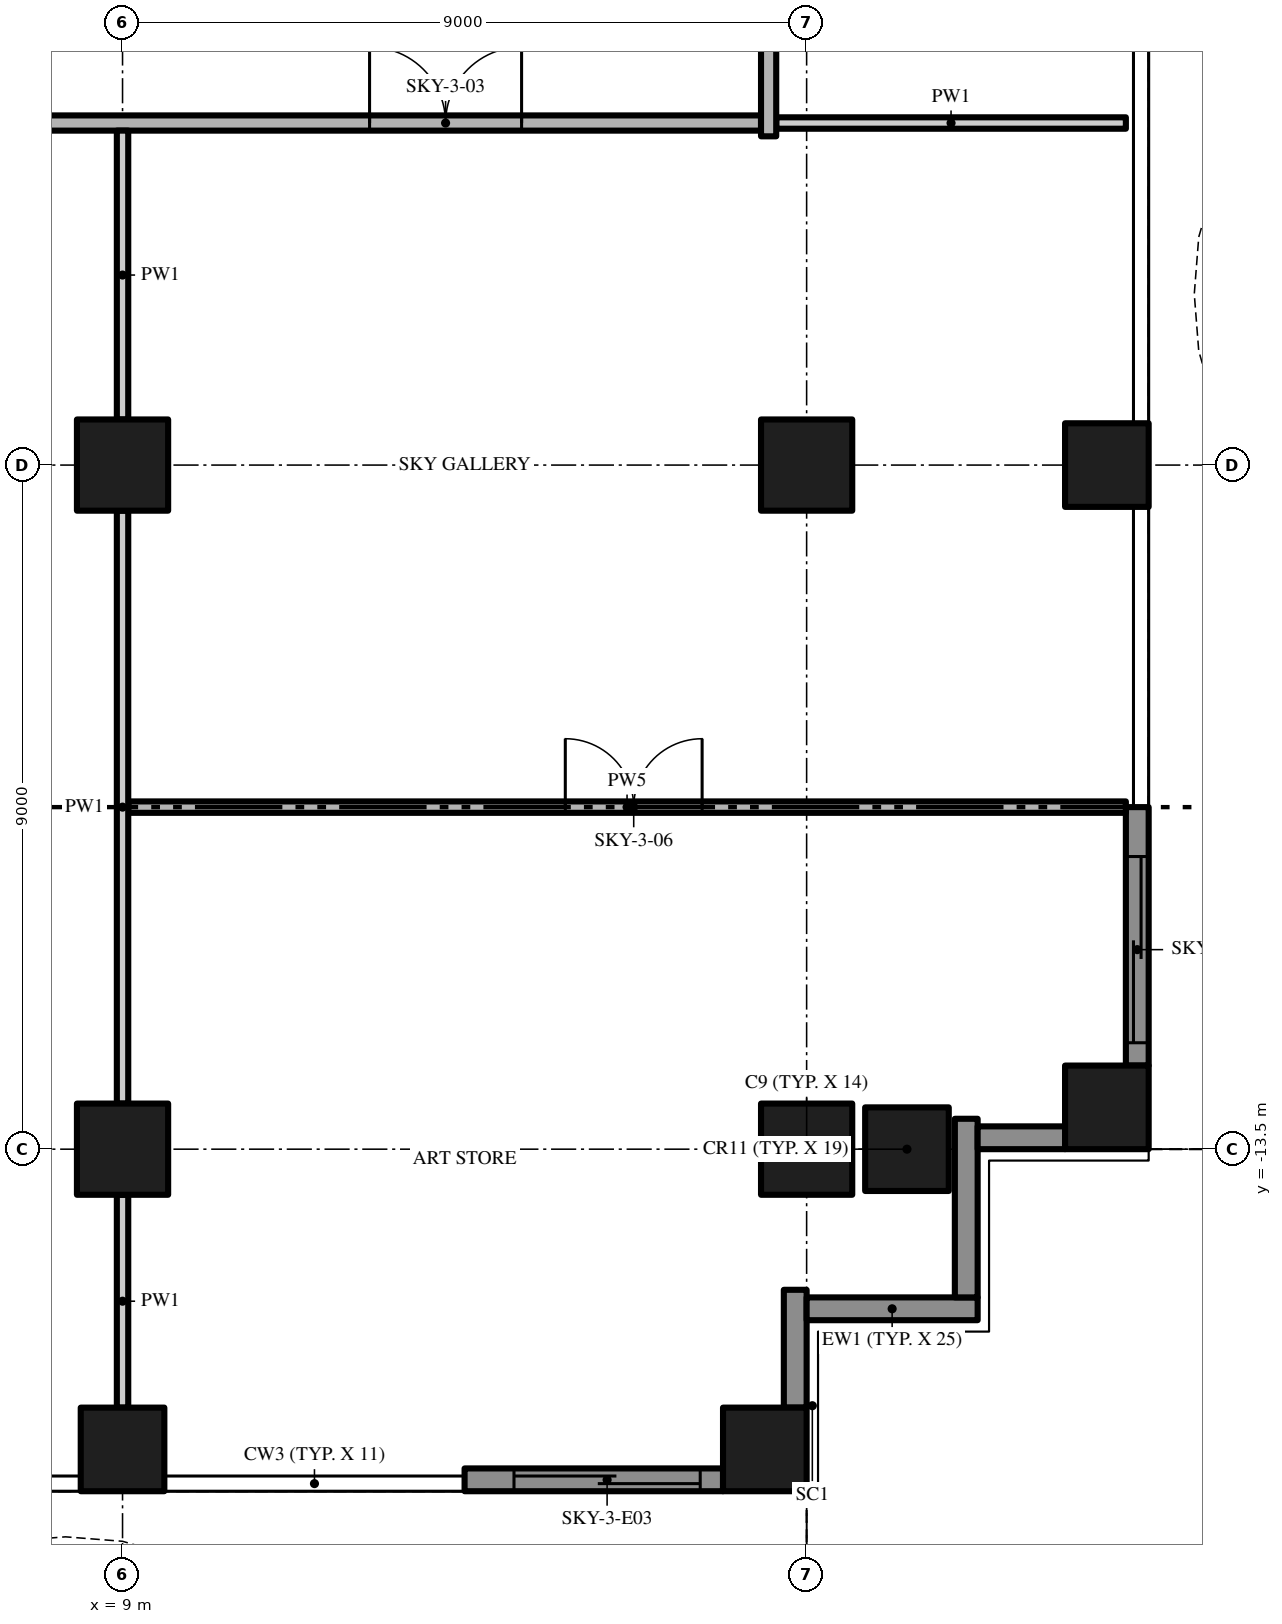
"""IFC4 building model, lengths in metres.
Left out: names, types, materials, properties, quantities, classifications, styles, units other than length and angle.
Written with IfcOpenShell. Run it as: python <this file> out.ifc"""

import sys

from ifc_helpers import new_model, si_unit, direction, frame, frame_2d, origin, origin_2d, place, context, subcontext, project, spatial, polyline, rectangle, outline, extrude, element, fill, save


model = new_model("IFC4")
c1 = context("Model", 3, precision=1e-05, world=origin(), true_north=direction((0.0, 1.0)))
c2 = subcontext(c1, "Body", "Model", "MODEL_VIEW")
j1 = project(units=[si_unit("LENGTHUNIT", "METRE"), si_unit("PLANEANGLEUNIT", "RADIAN")], contexts=[c1])
p1 = place(None, origin())
s1 = spatial("IfcSite", under=j1, at=p1, CompositionType="ELEMENT")
p2 = place(p1, origin())
s2 = spatial("IfcBuilding", under=s1, at=p2, CompositionType="ELEMENT")
p3 = place(p2, frame((0.0, 0.0, 174.4)))
s3 = spatial("IfcBuildingStorey", under=s2, at=p3, CompositionType="ELEMENT", Elevation=174.4)
p4 = place(p3, frame((18.0, -13.5, 0.0), z_axis=(0.0, 0.0, 1.0), x_axis=(1.0, 0.0, 0.0)))
e1 = element("IfcColumn", 1, at=p4, inside=s3, PredefinedType="COLUMN", context=c2, shape_type="SweptSolid", body=[
    extrude(rectangle(XDim=1.2, YDim=1.2, at=origin_2d()), origin(), (0.0, 0.0, 1.0), 4.7),
])
p5 = place(p3, frame((17.45, -17.45, 0.0), z_axis=(0.0, 0.0, 1.0), x_axis=(1.0, 0.0, 0.0)))
e2 = element("IfcColumn", 2, at=p5, inside=s3, PredefinedType="COLUMN", context=c2, shape_type="SweptSolid", body=[
    extrude(rectangle(XDim=1.1, YDim=1.1, at=origin_2d()), origin(), (0.0, 0.0, 1.0), 4.7),
])
p6 = place(p3, frame((18.0, -4.5, 0.0), z_axis=(0.0, 0.0, 1.0), x_axis=(1.0, 0.0, 0.0)))
e3 = element("IfcColumn", 3, at=p6, inside=s3, PredefinedType="COLUMN", context=c2, shape_type="SweptSolid", body=[
    extrude(rectangle(XDim=1.2, YDim=1.2, at=origin_2d()), origin(), (0.0, 0.0, 1.0), 4.7),
])
for number, where, z_axis, x_axis in (
    (4, (21.95, -12.95, 0.0), (0.0, 0.0, 1.0), (1.0, 0.0, 0.0)),
    (5, (19.32, -13.5, 0.0), (0.0, 0.0, 1.0), (1.0, 0.0, 0.0)),
    (6, (21.95, -4.5, 0.0), (0.0, 0.0, 1.0), (1.0, 0.0, 0.0)),
):
    element("IfcColumn", number, at=place(p3, frame(where, z_axis=z_axis, x_axis=x_axis)), inside=s3, PredefinedType="COLUMN", context=c2, shape_type="SweptSolid", body=[
        extrude(rectangle(XDim=1.1, YDim=1.1, at=origin_2d()), origin(), (0.0, 0.0, 1.0), 4.7),
    ])
p7 = place(p3, frame((9.0, -13.5, 0.0), z_axis=(0.0, 0.0, 1.0), x_axis=(1.0, 0.0, 0.0)))
e7 = element("IfcColumn", 7, at=p7, inside=s3, PredefinedType="COLUMN", context=c2, shape_type="SweptSolid", body=[
    extrude(rectangle(XDim=1.2, YDim=1.2, at=origin_2d()), origin(), (0.0, 0.0, 1.0), 4.7),
])
p8 = place(p3, frame((9.0, -17.45, 0.0), z_axis=(0.0, 0.0, 1.0), x_axis=(1.0, 0.0, 0.0)))
e8 = element("IfcColumn", 8, at=p8, inside=s3, PredefinedType="COLUMN", context=c2, shape_type="SweptSolid", body=[
    extrude(rectangle(XDim=1.1, YDim=1.1, at=origin_2d()), origin(), (0.0, 0.0, 1.0), 4.7),
])
p9 = place(p3, frame((9.0, -4.5, 0.0), z_axis=(0.0, 0.0, 1.0), x_axis=(1.0, 0.0, 0.0)))
e9 = element("IfcColumn", 9, at=p9, inside=s3, PredefinedType="COLUMN", context=c2, shape_type="SweptSolid", body=[
    extrude(rectangle(XDim=1.2, YDim=1.2, at=origin_2d()), origin(), (0.0, 0.0, 1.0), 4.7),
])
p10 = place(p3, frame((16.9, -17.85, 0.0), z_axis=(0.0, 0.0, 1.0), x_axis=(-1.0, 0.0, 0.0)))
e10 = element("IfcWall", 10, at=p10, inside=s3, PredefinedType="SOLIDWALL", context=c2, shape_type="SweptSolid", body=[
    extrude(rectangle(XDim=3.4, YDim=0.3, at=frame_2d((1.7, 0.0))), origin(), (0.0, 0.0, 1.0), 4.7),
])
p11 = place(p10, frame((0.3, 0.0, 0.0)))
e11 = element("IfcOpeningElement", 11, at=p11, cuts=e10, PredefinedType="OPENING", context=c2, shape_type="SweptSolid", body=[
    extrude(rectangle(XDim=2.45, YDim=2.4, at=frame_2d((1.225, 1.2))), frame((0.0, 0.16, 0.0), z_axis=(0.0, -1.0, 0.0), x_axis=(1.0, 0.0, 0.0)), (0.0, 0.0, 1.0), 0.32),
])
p12 = place(p3, frame((17.85, -15.35, 0.0), z_axis=(0.0, 0.0, 1.0), x_axis=(0.0, -1.0, 0.0)))
e12 = element("IfcWall", 12, at=p12, inside=s3, PredefinedType="SOLIDWALL", context=c2, shape_type="SweptSolid", body=[
    extrude(rectangle(XDim=1.55, YDim=0.3, at=frame_2d((0.775, 0.0))), origin(), (0.0, 0.0, 1.0), 4.7),
])
p13 = place(p3, frame((20.25, -15.6, 0.0), z_axis=(0.0, 0.0, 1.0), x_axis=(-1.0, 0.0, 0.0)))
e13 = element("IfcWall", 13, at=p13, inside=s3, PredefinedType="SOLIDWALL", context=c2, shape_type="SweptSolid", body=[
    extrude(rectangle(XDim=2.25, YDim=0.3, at=frame_2d((1.125, 0.0))), origin(), (0.0, 0.0, 1.0), 4.7),
])
p14 = place(p3, frame((20.1, -13.1, 0.0), z_axis=(0.0, 0.0, 1.0), x_axis=(0.0, -1.0, 0.0)))
e14 = element("IfcWall", 14, at=p14, inside=s3, PredefinedType="SOLIDWALL", context=c2, shape_type="SweptSolid", body=[
    extrude(rectangle(XDim=2.35, YDim=0.3, at=frame_2d((1.175, 0.0))), origin(), (0.0, 0.0, 1.0), 4.7),
])
p15 = place(p3, frame((21.4, -13.35, 0.0), z_axis=(0.0, 0.0, 1.0), x_axis=(-1.0, 0.0, 0.0)))
e15 = element("IfcWall", 15, at=p15, inside=s3, PredefinedType="SOLIDWALL", context=c2, shape_type="SweptSolid", body=[
    extrude(rectangle(XDim=1.15, YDim=0.3, at=frame_2d((0.575, 0.0))), origin(), (0.0, 0.0, 1.0), 4.7),
])
p16 = place(p3, frame((22.35, -9.0, 0.0), z_axis=(0.0, 0.0, 1.0), x_axis=(0.0, -1.0, 0.0)))
e16 = element("IfcWall", 16, at=p16, inside=s3, PredefinedType="SOLIDWALL", context=c2, shape_type="SweptSolid", body=[
    extrude(rectangle(XDim=3.4, YDim=0.3, at=frame_2d((1.7, 0.0))), origin(), (0.0, 0.0, 1.0), 4.7),
])
p17 = place(p16, frame((0.65, 0.0, 0.0)))
e17 = element("IfcOpeningElement", 17, at=p17, cuts=e16, PredefinedType="OPENING", context=c2, shape_type="SweptSolid", body=[
    extrude(rectangle(XDim=2.45, YDim=2.4, at=frame_2d((1.225, 1.2))), frame((0.0, 0.16, 0.0), z_axis=(0.0, -1.0, 0.0), x_axis=(1.0, 0.0, 0.0)), (0.0, 0.0, 1.0), 0.32),
])
p18 = place(p3, origin())
e18 = element("IfcWall", 18, at=p18, inside=s3, PredefinedType="USERDEFINED", context=c2, shape_type="SweptSolid", body=[
    extrude(outline(polyline([(-18.0, -19.8), (-16.5, -20.505), (-15.0, -20.941), (-14.25, -21.0), (-13.5, -20.941), (-12.0, -20.505), (-10.5, -19.8), (-9.0, -19.095), (-7.5, -18.659), (-6.75, -18.6), (-6.0, -18.659), (-4.5, -19.095), (-3.0, -19.8), (-1.5, -20.505), (0.0, -20.941), (0.75, -21.0), (1.5, -20.941), (3.0, -20.505), (4.5, -19.8), (6.0, -19.095), (7.5, -18.659), (8.25, -18.6), (9.0, -18.659), (10.5, -19.095), (12.0, -19.8), (13.5, -20.505), (15.0, -20.941), (15.75, -21.0), (16.5, -20.941), (18.0, -20.505), (17.93, -20.265), (16.455, -20.694), (15.75, -20.749), (15.045, -20.694), (13.589, -20.271), (12.106, -19.574), (10.589, -18.86), (9.045, -18.411), (8.25, -18.349), (7.455, -18.411), (5.911, -18.86), (4.394, -19.574), (2.911, -20.271), (1.455, -20.694), (0.75, -20.749), (0.045, -20.694), (-1.411, -20.271), (-2.894, -19.574), (-4.411, -18.86), (-5.955, -18.411), (-6.75, -18.349), (-7.545, -18.411), (-9.089, -18.86), (-10.606, -19.574), (-12.089, -20.271), (-13.545, -20.694), (-14.25, -20.749), (-14.955, -20.694), (-16.411, -20.271), (-17.894, -19.574), (-18.0, -19.8)])), origin(), (0.0, 0.0, 1.0), 0.9),
])
p19 = place(p3, origin())
e19 = element("IfcWall", 19, at=p19, inside=s3, PredefinedType="USERDEFINED", context=c2, shape_type="SweptSolid", body=[
    extrude(outline(polyline([(24.3, -13.5), (25.005, -12.0), (25.441, -10.5), (25.5, -9.75), (25.441, -9.0), (25.005, -7.5), (24.3, -6.0), (23.595, -4.5), (23.159, -3.0), (23.1, -2.25), (23.159, -1.5), (23.595, 0.0), (24.3, 1.5), (25.005, 3.0), (25.441, 4.5), (25.5, 5.25), (25.441, 6.0), (25.005, 7.5), (24.3, 9.0), (23.595, 10.5), (23.159, 12.0), (23.1, 12.75), (23.159, 13.5), (23.595, 15.0), (24.3, 16.5), (25.005, 18.0), (24.779, 18.106), (24.074, 16.606), (23.36, 15.089), (22.911, 13.545), (22.849, 12.75), (22.911, 11.955), (23.36, 10.411), (24.074, 8.894), (24.771, 7.411), (25.194, 5.955), (25.249, 5.25), (25.194, 4.545), (24.771, 3.089), (24.074, 1.606), (23.36, 0.089), (22.911, -1.455), (22.849, -2.25), (22.911, -3.045), (23.36, -4.589), (24.074, -6.106), (24.771, -7.589), (25.194, -9.045), (25.249, -9.75), (25.194, -10.455), (24.771, -11.911), (24.074, -13.394), (24.3, -13.5)])), origin(), (0.0, 0.0, 1.0), 0.9),
])
p20 = place(p3, frame((9.075, -9.0, 0.0), z_axis=(0.0, 0.0, 1.0), x_axis=(1.0, 0.0, 0.0)))
e20 = element("IfcWall", 20, at=p20, inside=s3, PredefinedType="PARTITIONING", context=c2, shape_type="SweptSolid", body=[
    extrude(rectangle(XDim=13.125, YDim=0.15, at=frame_2d((6.562, 0.0))), origin(), (0.0, 0.0, 1.0), 4.7),
])
p21 = place(p20, frame((5.75, 0.0, 0.0)))
e21 = element("IfcOpeningElement", 21, at=p21, cuts=e20, PredefinedType="OPENING", context=c2, shape_type="SweptSolid", body=[
    extrude(rectangle(XDim=1.8, YDim=2.4, at=frame_2d((0.9, 1.2))), frame((0.0, 0.085, 0.0), z_axis=(0.0, -1.0, 0.0), x_axis=(1.0, 0.0, 0.0)), (0.0, 0.0, 1.0), 0.17),
])
p22 = place(p3, frame((-17.4, 0.0, 0.0), z_axis=(0.0, 0.0, 1.0), x_axis=(1.0, 0.0, 0.0)))
e22 = element("IfcWall", 22, at=p22, inside=s3, PredefinedType="PARTITIONING", context=c2, shape_type="SweptSolid", body=[
    extrude(rectangle(XDim=34.8, YDim=0.2, at=frame_2d((17.4, 0.0))), origin(), (0.0, 0.0, 1.0), 4.7),
])
p23 = place(p22, frame((7.65, 0.0, 0.0)))
e23 = element("IfcOpeningElement", 23, at=p23, cuts=e22, PredefinedType="OPENING", context=c2, shape_type="SweptSolid", body=[
    extrude(rectangle(XDim=2.0, YDim=2.4, at=frame_2d((1.0, 1.2))), frame((0.0, 0.11, 0.0), z_axis=(0.0, -1.0, 0.0), x_axis=(1.0, 0.0, 0.0)), (0.0, 0.0, 1.0), 0.22),
])
p24 = place(p22, frame((20.9, 0.0, 0.0)))
e24 = element("IfcOpeningElement", 24, at=p24, cuts=e22, PredefinedType="OPENING", context=c2, shape_type="SweptSolid", body=[
    extrude(rectangle(XDim=2.0, YDim=2.4, at=frame_2d((1.0, 1.2))), frame((0.0, 0.11, 0.0), z_axis=(0.0, -1.0, 0.0), x_axis=(1.0, 0.0, 0.0)), (0.0, 0.0, 1.0), 0.22),
])
p25 = place(p22, frame((29.65, 0.0, 0.0)))
e25 = element("IfcOpeningElement", 25, at=p25, cuts=e22, PredefinedType="OPENING", context=c2, shape_type="SweptSolid", body=[
    extrude(rectangle(XDim=2.0, YDim=2.4, at=frame_2d((1.0, 1.2))), frame((0.0, 0.11, 0.0), z_axis=(0.0, -1.0, 0.0), x_axis=(1.0, 0.0, 0.0)), (0.0, 0.0, 1.0), 0.22),
])
p26 = place(p3, frame((17.6, 0.0, 0.0), z_axis=(0.0, 0.0, 1.0), x_axis=(1.0, 0.0, 0.0)))
e26 = element("IfcWall", 26, at=p26, inside=s3, PredefinedType="PARTITIONING", context=c2, shape_type="SweptSolid", body=[
    extrude(rectangle(XDim=4.6, YDim=0.15, at=frame_2d((2.3, 0.0))), origin(), (0.0, 0.0, 1.0), 4.7),
])
p27 = place(p3, frame((9.0, -16.9, 0.0), z_axis=(0.0, 0.0, 1.0), x_axis=(0.0, 1.0, 0.0)))
e27 = element("IfcWall", 27, at=p27, inside=s3, PredefinedType="PARTITIONING", context=c2, shape_type="SweptSolid", body=[
    extrude(rectangle(XDim=2.8, YDim=0.15, at=frame_2d((1.4, 0.0))), origin(), (0.0, 0.0, 1.0), 4.7),
])
p28 = place(p3, frame((9.0, -12.9, 0.0), z_axis=(0.0, 0.0, 1.0), x_axis=(0.0, 1.0, 0.0)))
e28 = element("IfcWall", 28, at=p28, inside=s3, PredefinedType="PARTITIONING", context=c2, shape_type="SweptSolid", body=[
    extrude(rectangle(XDim=7.8, YDim=0.15, at=frame_2d((3.9, 0.0))), origin(), (0.0, 0.0, 1.0), 4.7),
])
p29 = place(p3, frame((9.0, -3.9, 0.0), z_axis=(0.0, 0.0, 1.0), x_axis=(0.0, 1.0, 0.0)))
e29 = element("IfcWall", 29, at=p29, inside=s3, PredefinedType="PARTITIONING", context=c2, shape_type="SweptSolid", body=[
    extrude(rectangle(XDim=3.8, YDim=0.15, at=frame_2d((1.9, 0.0))), origin(), (0.0, 0.0, 1.0), 4.7),
])
p30 = place(p3, frame((17.5, -0.175, 0.0), z_axis=(0.0, 0.0, 1.0), x_axis=(0.0, 1.0, 0.0)))
e30 = element("IfcWall", 30, at=p30, inside=s3, PredefinedType="PARTITIONING", context=c2, shape_type="SweptSolid", body=[
    extrude(rectangle(XDim=4.075, YDim=0.2, at=frame_2d((2.038, 0.0))), origin(), (0.0, 0.0, 1.0), 4.7),
])
p31 = place(p11, origin())
e31 = element("IfcDoor", 31, at=p31, inside=s3, OperationType="SINGLE_SWING_LEFT", PredefinedType="DOOR", context=c2, shape_type="SweptSolid", body=[
    extrude(rectangle(XDim=2.45, YDim=2.4, at=frame_2d((1.225, 1.2))), frame((0.0, 0.025, 0.0), z_axis=(0.0, -1.0, 0.0), x_axis=(1.0, 0.0, 0.0)), (0.0, 0.0, 1.0), 0.05),
])
fill(e11, e31)
p32 = place(p17, origin())
e32 = element("IfcDoor", 32, at=p32, inside=s3, OperationType="SINGLE_SWING_LEFT", PredefinedType="DOOR", context=c2, shape_type="SweptSolid", body=[
    extrude(rectangle(XDim=2.45, YDim=2.4, at=frame_2d((1.225, 1.2))), frame((0.0, 0.025, 0.0), z_axis=(0.0, -1.0, 0.0), x_axis=(1.0, 0.0, 0.0)), (0.0, 0.0, 1.0), 0.05),
])
fill(e17, e32)
p33 = place(p25, origin())
e33 = element("IfcDoor", 33, at=p33, inside=s3, OperationType="DOUBLE_DOOR_SINGLE_SWING", PredefinedType="DOOR", context=c2, shape_type="SweptSolid", body=[
    extrude(rectangle(XDim=2.0, YDim=2.4, at=frame_2d((1.0, 1.2))), frame((0.0, 0.025, 0.0), z_axis=(0.0, -1.0, 0.0), x_axis=(1.0, 0.0, 0.0)), (0.0, 0.0, 1.0), 0.05),
])
fill(e25, e33)
p34 = place(p21, origin())
e34 = element("IfcDoor", 34, at=p34, inside=s3, OperationType="DOUBLE_DOOR_SINGLE_SWING", PredefinedType="DOOR", context=c2, shape_type="SweptSolid", body=[
    extrude(rectangle(XDim=1.8, YDim=2.4, at=frame_2d((0.9, 1.2))), frame((0.0, 0.025, 0.0), z_axis=(0.0, -1.0, 0.0), x_axis=(1.0, 0.0, 0.0)), (0.0, 0.0, 1.0), 0.05),
])
fill(e21, e34)
save(model, sys.argv[1])
